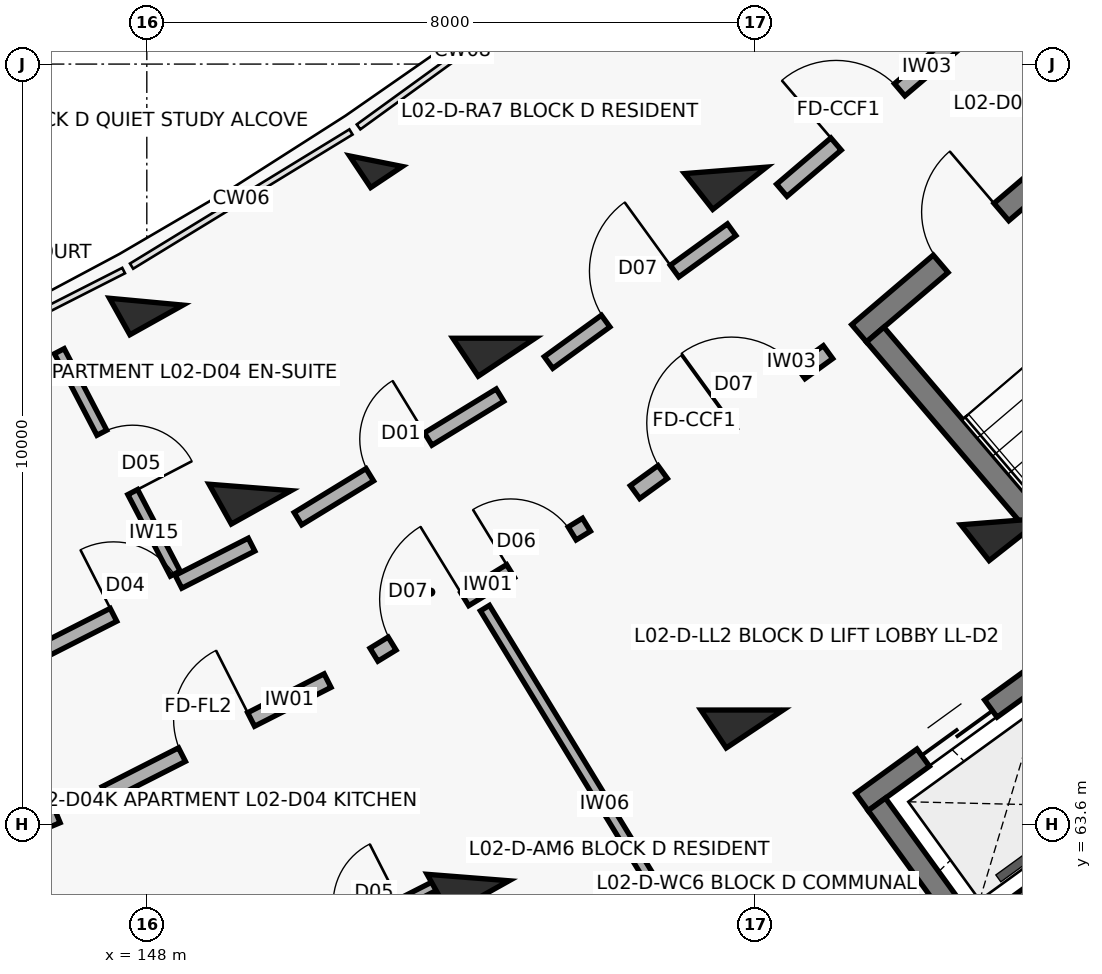
"""IFC4 building model, lengths in metres.
Left out: names, types, materials, properties, quantities, classifications, styles, units other than length and angle.
Written with IfcOpenShell. Run it as: python <this file> out.ifc"""

import sys

from ifc_helpers import new_model, si_unit, direction, frame, frame_2d, origin, origin_2d, place, context, subcontext, project, spatial, rectangle, extrude, element, fill, save


model = new_model("IFC4")
c1 = context("Model", 3, precision=1e-05, world=origin(), true_north=direction((0.0, 1.0)))
c2 = subcontext(c1, "Body", "Model", "MODEL_VIEW")
j1 = project(units=[si_unit("LENGTHUNIT", "METRE"), si_unit("PLANEANGLEUNIT", "RADIAN")], contexts=[c1])
p1 = place(None, origin())
s1 = spatial("IfcSite", under=j1, at=p1, CompositionType="ELEMENT")
p2 = place(p1, origin())
s2 = spatial("IfcBuilding", under=s1, at=p2, CompositionType="ELEMENT")
p3 = place(p2, frame((0.0, 0.0, 8.1)))
s3 = spatial("IfcBuildingStorey", under=s2, at=p3, CompositionType="ELEMENT", Elevation=8.1)
p4 = place(p3, frame((147.992, 70.474, 0.0), z_axis=(0.0, 0.0, 1.0), x_axis=(0.487859659139, -0.87292207727, 0.0)))
e1 = element("IfcColumn", 1, at=p4, inside=s3, PredefinedType="COLUMN", context=c2, shape_type="SweptSolid", body=[
    extrude(rectangle(XDim=0.55, YDim=0.8, at=origin_2d()), origin(), (0.0, 0.0, 1.0), 3.1),
])
for number, where, z_axis, x_axis in (
    (2, (149.358, 68.03, 0.0), (0.0, 0.0, 1.0), (0.488, -0.873, 0.0)),
    (3, (152.227, 62.897, 0.0), (0.0, 0.0, 1.0), (0.488, -0.873, 0.0)),
):
    element("IfcColumn", number, at=place(p3, frame(where, z_axis=z_axis, x_axis=x_axis)), inside=s3, PredefinedType="COLUMN", context=c2, shape_type="SweptSolid", body=[
        extrude(rectangle(XDim=0.6, YDim=0.9, at=origin_2d()), origin(), (0.0, 0.0, 1.0), 3.1),
    ])
p5 = place(p3, frame((151.015, 72.322, 0.0), z_axis=(0.0, 0.0, 1.0), x_axis=(0.554844427448, -0.83195412213, 0.0)))
e4 = element("IfcColumn", 4, at=p5, inside=s3, PredefinedType="COLUMN", context=c2, shape_type="SweptSolid", body=[
    extrude(rectangle(XDim=0.5, YDim=0.5, at=origin_2d()), origin(), (0.0, 0.0, 1.0), 3.1),
])
for number, where, z_axis, x_axis in (
    (5, (152.568, 69.993, 0.0), (0.0, 0.0, 1.0), (0.555, -0.832, 0.0)),
    (6, (155.831, 65.101, 0.0), (0.0, 0.0, 1.0), (0.555, -0.832, 0.0)),
    (7, (155.614, 72.202, 0.0), (0.0, 0.0, 1.0), (0.618, -0.786, 0.0)),
    (8, (159.25, 67.581, 0.0), (0.0, 0.0, 1.0), (0.618, -0.786, 0.0)),
):
    element("IfcColumn", number, at=place(p3, frame(where, z_axis=z_axis, x_axis=x_axis)), inside=s3, PredefinedType="COLUMN", context=c2, shape_type="SweptSolid", body=[
        extrude(rectangle(XDim=0.6, YDim=0.9, at=origin_2d()), origin(), (0.0, 0.0, 1.0), 3.1),
    ])
p6 = place(p3, frame((159.262, 79.041, 0.0), z_axis=(0.0, 0.0, 1.0), x_axis=(0.733738684326, -0.679431779595, 0.0)))
e9 = element("IfcWall", 9, at=p6, inside=s3, PredefinedType="SOLIDWALL", context=c2, shape_type="SweptSolid", body=[
    extrude(rectangle(XDim=8.2, YDim=0.265, at=frame_2d((4.1, 0.0))), origin(), (0.0, 0.0, 1.0), 2.08),
])
p7 = place(p6, frame((3.59, 0.0, 0.75)))
e10 = element("IfcOpeningElement", 10, at=p7, cuts=e9, PredefinedType="OPENING", context=c2, shape_type="SweptSolid", body=[
    extrude(rectangle(XDim=1.35, YDim=1.35, at=frame_2d((0.675, 0.675))), frame((0.0, 0.142, 0.0), z_axis=(0.0, -1.0, 0.0), x_axis=(1.0, 0.0, 0.0)), (0.0, 0.0, 1.0), 0.285),
])
p8 = place(p3, frame((157.372, 70.058, 0.0), z_axis=(0.0, 0.0, 1.0), x_axis=(0.760990583254, 0.648762924495, 0.0)))
e11 = element("IfcWall", 11, at=p8, inside=s3, PredefinedType="SHEAR", context=c2, shape_type="SweptSolid", body=[
    extrude(rectangle(XDim=3.87, YDim=0.3, at=frame_2d((1.935, 0.0))), origin(), (0.0, 0.0, 1.0), 3.1),
])
p9 = place(p8, frame((1.41, 0.0, 0.0)))
e12 = element("IfcOpeningElement", 12, at=p9, cuts=e11, PredefinedType="OPENING", context=c2, shape_type="SweptSolid", body=[
    extrude(rectangle(XDim=1.05, YDim=2.15, at=frame_2d((0.525, 1.075))), frame((0.0, 0.16, 0.0), z_axis=(0.0, -1.0, 0.0), x_axis=(1.0, 0.0, 0.0)), (0.0, 0.0, 1.0), 0.32),
])
p10 = place(p3, frame((157.583, 70.041, 0.0), z_axis=(0.0, 0.0, 1.0), x_axis=(0.648762810187, -0.760990680704, 0.0)))
e13 = element("IfcWall", 13, at=p10, inside=s3, PredefinedType="SHEAR", context=c2, shape_type="SweptSolid", body=[
    extrude(rectangle(XDim=7.69, YDim=0.3, at=frame_2d((3.845, 0.0))), origin(), (0.0, 0.0, 1.0), 3.1),
])
p11 = place(p3, frame((157.409, 63.89, 0.0), z_axis=(0.0, 0.0, 1.0), x_axis=(0.809510936031, 0.587104798521, 0.0)))
e14 = element("IfcWall", 14, at=p11, inside=s3, PredefinedType="SHEAR", context=c2, shape_type="SweptSolid", body=[
    extrude(rectangle(XDim=3.09, YDim=0.28, at=frame_2d((1.545, 0.0))), origin(), (0.0, 0.0, 1.0), 3.1),
])
p12 = place(p11, frame((0.995, 0.0, 0.0)))
e15 = element("IfcOpeningElement", 15, at=p12, cuts=e14, PredefinedType="OPENING", context=c2, shape_type="SweptSolid", body=[
    extrude(rectangle(XDim=1.1, YDim=2.15, at=frame_2d((0.55, 1.075))), frame((0.0, 0.15, 0.0), z_axis=(0.0, -1.0, 0.0), x_axis=(1.0, 0.0, 0.0)), (0.0, 0.0, 1.0), 0.3),
])
p13 = place(p3, frame((158.765, 62.021, 0.0), z_axis=(0.0, 0.0, 1.0), x_axis=(0.809548485838, 0.587053020669, 0.0)))
e16 = element("IfcWall", 16, at=p13, inside=s3, PredefinedType="SHEAR", context=c2, shape_type="SweptSolid", body=[
    extrude(rectangle(XDim=3.09, YDim=0.28, at=frame_2d((1.545, 0.0))), origin(), (0.0, 0.0, 1.0), 3.1),
])
p14 = place(p3, frame((157.604, 63.859, 0.0), z_axis=(0.0, 0.0, 1.0), x_axis=(0.587127188998, -0.809494696671, 0.0)))
e17 = element("IfcWall", 17, at=p14, inside=s3, PredefinedType="SHEAR", context=c2, shape_type="SweptSolid", body=[
    extrude(rectangle(XDim=2.03, YDim=0.28, at=frame_2d((1.015, 0.0))), origin(), (0.0, 0.0, 1.0), 3.1),
])
p15 = place(p3, frame((143.793, 62.459, 0.0), z_axis=(0.0, 0.0, 1.0), x_axis=(0.924214561665, 0.381873596896, 0.0)))
e18 = element("IfcWall", 18, at=p15, inside=s3, PredefinedType="SOLIDWALL", context=c2, shape_type="SweptSolid", body=[
    extrude(rectangle(XDim=3.277, YDim=0.2, at=frame_2d((1.639, 0.0))), origin(), (0.0, 0.0, 1.0), 2.08),
])
p16 = place(p15, frame((1.148, 0.0, 0.0)))
e19 = element("IfcOpeningElement", 19, at=p16, cuts=e18, PredefinedType="OPENING", context=c2, shape_type="SweptSolid", body=[
    extrude(rectangle(XDim=0.98, YDim=2.15, at=frame_2d((0.49, 1.075))), frame((0.0, 0.11, 0.0), z_axis=(0.0, -1.0, 0.0), x_axis=(1.0, 0.0, 0.0)), (0.0, 0.0, 1.0), 0.22),
])
p17 = place(p3, frame((147.457, 64.003, 0.0), z_axis=(0.0, 0.0, 1.0), x_axis=(0.891412167565, 0.45319349898, 0.0)))
e20 = element("IfcWall", 20, at=p17, inside=s3, PredefinedType="SOLIDWALL", context=c2, shape_type="SweptSolid", body=[
    extrude(rectangle(XDim=3.277, YDim=0.2, at=frame_2d((1.639, 0.0))), origin(), (0.0, 0.0, 1.0), 2.08),
])
p18 = place(p17, frame((1.128, 0.0, 0.0)))
e21 = element("IfcOpeningElement", 21, at=p18, cuts=e20, PredefinedType="OPENING", context=c2, shape_type="SweptSolid", body=[
    extrude(rectangle(XDim=1.02, YDim=2.15, at=frame_2d((0.51, 1.075))), frame((0.0, 0.11, 0.0), z_axis=(0.0, -1.0, 0.0), x_axis=(1.0, 0.0, 0.0)), (0.0, 0.0, 1.0), 0.22),
])
p19 = place(p3, frame((146.6, 65.865, 0.0), z_axis=(0.0, 0.0, 1.0), x_axis=(0.891414101388, 0.453189695212, 0.0)))
e22 = element("IfcWall", 22, at=p19, inside=s3, PredefinedType="SOLIDWALL", context=c2, shape_type="SweptSolid", body=[
    extrude(rectangle(XDim=3.116, YDim=0.19, at=frame_2d((1.558, 0.0))), origin(), (0.0, 0.0, 1.0), 2.08),
])
p20 = place(p19, frame((1.078, 0.0, 0.0)))
e23 = element("IfcOpeningElement", 23, at=p20, cuts=e22, PredefinedType="OPENING", context=c2, shape_type="SweptSolid", body=[
    extrude(rectangle(XDim=0.96, YDim=2.1, at=frame_2d((0.48, 1.05))), frame((0.0, 0.105, 0.0), z_axis=(0.0, -1.0, 0.0), x_axis=(1.0, 0.0, 0.0)), (0.0, 0.0, 1.0), 0.21),
])
p21 = place(p3, frame((146.849, 69.822, 0.0), z_axis=(0.0, 0.0, 1.0), x_axis=(0.462242343884, -0.886753638572, 0.0)))
e24 = element("IfcWall", 24, at=p21, inside=s3, PredefinedType="PARTITIONING", context=c2, shape_type="SweptSolid", body=[
    extrude(rectangle(XDim=3.3, YDim=0.145, at=frame_2d((1.65, 0.0))), origin(), (0.0, 0.0, 1.0), 2.08),
])
p22 = place(p21, frame((1.21, 0.0, 0.0)))
e25 = element("IfcOpeningElement", 25, at=p22, cuts=e24, PredefinedType="OPENING", context=c2, shape_type="SweptSolid", body=[
    extrude(rectangle(XDim=0.88, YDim=2.1, at=frame_2d((0.44, 1.05))), frame((0.0, 0.083, 0.0), z_axis=(0.0, -1.0, 0.0), x_axis=(1.0, 0.0, 0.0)), (0.0, 0.0, 1.0), 0.165),
])
p23 = place(p3, frame((148.687, 61.209, 0.0), z_axis=(0.0, 0.0, 1.0), x_axis=(0.891396224028, 0.453224857866, 0.0)))
e26 = element("IfcWall", 26, at=p23, inside=s3, PredefinedType="PARTITIONING", context=c2, shape_type="SweptSolid", body=[
    extrude(rectangle(XDim=3.617, YDim=0.125, at=frame_2d((1.808, 0.0))), origin(), (0.0, 0.0, 1.0), 2.08),
])
p24 = place(p23, frame((0.65, 0.0, 0.0)))
e27 = element("IfcOpeningElement", 27, at=p24, cuts=e26, PredefinedType="OPENING", context=c2, shape_type="SweptSolid", body=[
    extrude(rectangle(XDim=0.9, YDim=2.1, at=frame_2d((0.45, 1.05))), frame((0.0, 0.073, 0.0), z_axis=(0.0, -1.0, 0.0), x_axis=(1.0, 0.0, 0.0)), (0.0, 0.0, 1.0), 0.145),
])
p25 = place(p23, frame((2.086, 0.0, 0.0)))
e28 = element("IfcOpeningElement", 28, at=p25, cuts=e26, PredefinedType="OPENING", context=c2, shape_type="SweptSolid", body=[
    extrude(rectangle(XDim=0.88, YDim=2.1, at=frame_2d((0.44, 1.05))), frame((0.0, 0.073, 0.0), z_axis=(0.0, -1.0, 0.0), x_axis=(1.0, 0.0, 0.0)), (0.0, 0.0, 1.0), 0.145),
])
p26 = place(p3, frame((150.989, 65.829, 0.0), z_axis=(0.0, 0.0, 1.0), x_axis=(0.853090237845, 0.521763400492, 0.0)))
e29 = element("IfcWall", 29, at=p26, inside=s3, PredefinedType="SOLIDWALL", context=c2, shape_type="SweptSolid", body=[
    extrude(rectangle(XDim=3.277, YDim=0.2, at=frame_2d((1.638, 0.0))), origin(), (0.0, 0.0, 1.0), 2.08),
])
p27 = place(p26, frame((0.28, 0.0, 0.0)))
e30 = element("IfcOpeningElement", 30, at=p27, cuts=e29, PredefinedType="OPENING", context=c2, shape_type="SweptSolid", body=[
    extrude(rectangle(XDim=1.12, YDim=2.15, at=frame_2d((0.56, 1.075))), frame((0.0, 0.11, 0.0), z_axis=(0.0, -1.0, 0.0), x_axis=(1.0, 0.0, 0.0)), (0.0, 0.0, 1.0), 0.22),
])
p28 = place(p26, frame((2.107, 0.0, 0.0)))
e31 = element("IfcOpeningElement", 31, at=p28, cuts=e29, PredefinedType="OPENING", context=c2, shape_type="SweptSolid", body=[
    extrude(rectangle(XDim=0.95, YDim=2.1, at=frame_2d((0.475, 1.05))), frame((0.0, 0.11, 0.0), z_axis=(0.0, -1.0, 0.0), x_axis=(1.0, 0.0, 0.0)), (0.0, 0.0, 1.0), 0.22),
])
p29 = place(p3, frame((149.989, 67.619, 0.0), z_axis=(0.0, 0.0, 1.0), x_axis=(0.853121049608, 0.5217130195, 0.0)))
e32 = element("IfcWall", 32, at=p29, inside=s3, PredefinedType="SOLIDWALL", context=c2, shape_type="SweptSolid", body=[
    extrude(rectangle(XDim=3.116, YDim=0.19, at=frame_2d((1.558, 0.0))), origin(), (0.0, 0.0, 1.0), 2.08),
])
p30 = place(p29, frame((1.108, 0.0, 0.0)))
e33 = element("IfcOpeningElement", 33, at=p30, cuts=e32, PredefinedType="OPENING", context=c2, shape_type="SweptSolid", body=[
    extrude(rectangle(XDim=0.9, YDim=2.1, at=frame_2d((0.45, 1.05))), frame((0.0, 0.105, 0.0), z_axis=(0.0, -1.0, 0.0), x_axis=(1.0, 0.0, 0.0)), (0.0, 0.0, 1.0), 0.21),
])
p31 = place(p3, frame((152.448, 66.442, 0.0), z_axis=(0.0, 0.0, 1.0), x_axis=(0.520511872578, -0.853854431683, 0.0)))
e34 = element("IfcWall", 34, at=p31, inside=s3, PredefinedType="PARTITIONING", context=c2, shape_type="SweptSolid", body=[
    extrude(rectangle(XDim=7.95, YDim=0.14, at=frame_2d((3.975, 0.0))), origin(), (0.0, 0.0, 1.0), 2.08),
])
p32 = place(p31, frame((6.05, 0.0, 0.0)))
e35 = element("IfcOpeningElement", 35, at=p32, cuts=e34, PredefinedType="OPENING", context=c2, shape_type="SweptSolid", body=[
    extrude(rectangle(XDim=0.92, YDim=2.1, at=frame_2d((0.46, 1.05))), frame((0.0, 0.08, 0.0), z_axis=(0.0, -1.0, 0.0), x_axis=(1.0, 0.0, 0.0)), (0.0, 0.0, 1.0), 0.16),
])
p33 = place(p3, frame((154.423, 67.968, 0.0), z_axis=(0.0, 0.0, 1.0), x_axis=(0.809516127005, 0.587097641043, 0.0)))
e36 = element("IfcWall", 36, at=p33, inside=s3, PredefinedType="SOLIDWALL", context=c2, shape_type="SweptSolid", body=[
    extrude(rectangle(XDim=3.137, YDim=0.21, at=frame_2d((1.569, 0.0))), origin(), (0.0, 0.0, 1.0), 2.08),
])
p34 = place(p33, frame((0.45, 0.0, 0.0)))
e37 = element("IfcOpeningElement", 37, at=p34, cuts=e36, PredefinedType="OPENING", context=c2, shape_type="SweptSolid", body=[
    extrude(rectangle(XDim=1.1, YDim=2.15, at=frame_2d((0.55, 1.075))), frame((0.0, 0.115, 0.0), z_axis=(0.0, -1.0, 0.0), x_axis=(1.0, 0.0, 0.0)), (0.0, 0.0, 1.0), 0.23),
])
p35 = place(p33, frame((1.567, 0.0, 0.0)))
e38 = element("IfcOpeningElement", 38, at=p35, cuts=e36, PredefinedType="OPENING", context=c2, shape_type="SweptSolid", body=[
    extrude(rectangle(XDim=1.12, YDim=2.15, at=frame_2d((0.56, 1.075))), frame((0.0, 0.115, 0.0), z_axis=(0.0, -1.0, 0.0), x_axis=(1.0, 0.0, 0.0)), (0.0, 0.0, 1.0), 0.23),
])
p36 = place(p3, frame((153.285, 69.674, 0.0), z_axis=(0.0, 0.0, 1.0), x_axis=(0.809505174959, 0.587112741911, 0.0)))
e39 = element("IfcWall", 39, at=p36, inside=s3, PredefinedType="SOLIDWALL", context=c2, shape_type="SweptSolid", body=[
    extrude(rectangle(XDim=2.976, YDim=0.19, at=frame_2d((1.488, 0.0))), origin(), (0.0, 0.0, 1.0), 2.08),
])
p37 = place(p36, frame((0.928, 0.0, 0.0)))
e40 = element("IfcOpeningElement", 40, at=p37, cuts=e39, PredefinedType="OPENING", context=c2, shape_type="SweptSolid", body=[
    extrude(rectangle(XDim=1.12, YDim=2.15, at=frame_2d((0.56, 1.075))), frame((0.0, 0.105, 0.0), z_axis=(0.0, -1.0, 0.0), x_axis=(1.0, 0.0, 0.0)), (0.0, 0.0, 1.0), 0.21),
])
p38 = place(p3, frame((156.354, 71.94, 0.0), z_axis=(0.0, 0.0, 1.0), x_axis=(0.760991187621, 0.648762215579, 0.0)))
e41 = element("IfcWall", 41, at=p38, inside=s3, PredefinedType="SOLIDWALL", context=c2, shape_type="SweptSolid", body=[
    extrude(rectangle(XDim=2.976, YDim=0.21, at=frame_2d((1.488, 0.0))), origin(), (0.0, 0.0, 1.0), 2.08),
])
p39 = place(p38, frame((0.938, 0.0, 0.0)))
e42 = element("IfcOpeningElement", 42, at=p39, cuts=e41, PredefinedType="OPENING", context=c2, shape_type="SweptSolid", body=[
    extrude(rectangle(XDim=1.1, YDim=2.15, at=frame_2d((0.55, 1.075))), frame((0.0, 0.115, 0.0), z_axis=(0.0, -1.0, 0.0), x_axis=(1.0, 0.0, 0.0)), (0.0, 0.0, 1.0), 0.23),
])
p40 = place(p9, origin())
e43 = element("IfcDoor", 43, at=p40, inside=s3, OperationType="SINGLE_SWING_RIGHT", PredefinedType="DOOR", context=c2, shape_type="SweptSolid", body=[
    extrude(rectangle(XDim=1.05, YDim=2.15, at=frame_2d((0.525, 1.075))), frame((0.0, 0.025, 0.0), z_axis=(0.0, -1.0, 0.0), x_axis=(1.0, 0.0, 0.0)), (0.0, 0.0, 1.0), 0.05),
])
fill(e12, e43)
p41 = place(p12, origin())
e44 = element("IfcDoor", 44, at=p41, inside=s3, OperationType="DOUBLE_DOOR_SLIDING", PredefinedType="DOOR", context=c2, shape_type="SweptSolid", body=[
    extrude(rectangle(XDim=1.1, YDim=2.15, at=frame_2d((0.55, 1.075))), frame((0.0, 0.025, 0.0), z_axis=(0.0, -1.0, 0.0), x_axis=(1.0, 0.0, 0.0)), (0.0, 0.0, 1.0), 0.05),
])
fill(e15, e44)
p42 = place(p18, origin())
e45 = element("IfcDoor", 45, at=p42, inside=s3, OperationType="SINGLE_SWING_RIGHT", PredefinedType="DOOR", context=c2, shape_type="SweptSolid", body=[
    extrude(rectangle(XDim=1.02, YDim=2.15, at=frame_2d((0.51, 1.075))), frame((0.0, 0.025, 0.0), z_axis=(0.0, -1.0, 0.0), x_axis=(1.0, 0.0, 0.0)), (0.0, 0.0, 1.0), 0.05),
])
fill(e21, e45)
p43 = place(p20, origin())
e46 = element("IfcDoor", 46, at=p43, inside=s3, OperationType="SINGLE_SWING_LEFT", PredefinedType="DOOR", context=c2, shape_type="SweptSolid", body=[
    extrude(rectangle(XDim=0.96, YDim=2.1, at=frame_2d((0.48, 1.05))), frame((0.0, 0.025, 0.0), z_axis=(0.0, -1.0, 0.0), x_axis=(1.0, 0.0, 0.0)), (0.0, 0.0, 1.0), 0.05),
])
fill(e23, e46)
p44 = place(p22, origin())
e47 = element("IfcDoor", 47, at=p44, inside=s3, OperationType="SINGLE_SWING_RIGHT", PredefinedType="DOOR", context=c2, shape_type="SweptSolid", body=[
    extrude(rectangle(XDim=0.88, YDim=2.1, at=frame_2d((0.44, 1.05))), frame((0.0, 0.025, 0.0), z_axis=(0.0, -1.0, 0.0), x_axis=(1.0, 0.0, 0.0)), (0.0, 0.0, 1.0), 0.05),
])
fill(e25, e47)
p45 = place(p27, origin())
e48 = element("IfcDoor", 48, at=p45, inside=s3, OperationType="SINGLE_SWING_RIGHT", PredefinedType="DOOR", context=c2, shape_type="SweptSolid", body=[
    extrude(rectangle(XDim=1.12, YDim=2.15, at=frame_2d((0.56, 1.075))), frame((0.0, 0.025, 0.0), z_axis=(0.0, -1.0, 0.0), x_axis=(1.0, 0.0, 0.0)), (0.0, 0.0, 1.0), 0.05),
])
fill(e30, e48)
p46 = place(p28, origin())
e49 = element("IfcDoor", 49, at=p46, inside=s3, OperationType="SINGLE_SWING_LEFT", PredefinedType="DOOR", context=c2, shape_type="SweptSolid", body=[
    extrude(rectangle(XDim=0.95, YDim=2.1, at=frame_2d((0.475, 1.05))), frame((0.0, 0.025, 0.0), z_axis=(0.0, -1.0, 0.0), x_axis=(1.0, 0.0, 0.0)), (0.0, 0.0, 1.0), 0.05),
])
fill(e31, e49)
p47 = place(p30, origin())
e50 = element("IfcDoor", 50, at=p47, inside=s3, OperationType="SINGLE_SWING_RIGHT", PredefinedType="DOOR", context=c2, shape_type="SweptSolid", body=[
    extrude(rectangle(XDim=0.9, YDim=2.1, at=frame_2d((0.45, 1.05))), frame((0.0, 0.025, 0.0), z_axis=(0.0, -1.0, 0.0), x_axis=(1.0, 0.0, 0.0)), (0.0, 0.0, 1.0), 0.05),
])
fill(e33, e50)
p48 = place(p34, origin())
e51 = element("IfcDoor", 51, at=p48, inside=s3, OperationType="SINGLE_SWING_RIGHT", PredefinedType="DOOR", context=c2, shape_type="SweptSolid", body=[
    extrude(rectangle(XDim=1.1, YDim=2.15, at=frame_2d((0.55, 1.075))), frame((0.0, 0.025, 0.0), z_axis=(0.0, -1.0, 0.0), x_axis=(1.0, 0.0, 0.0)), (0.0, 0.0, 1.0), 0.05),
])
fill(e37, e51)
p49 = place(p35, origin())
e52 = element("IfcDoor", 52, at=p49, inside=s3, OperationType="SINGLE_SWING_LEFT", PredefinedType="DOOR", context=c2, shape_type="SweptSolid", body=[
    extrude(rectangle(XDim=1.12, YDim=2.15, at=frame_2d((0.56, 1.075))), frame((0.0, 0.025, 0.0), z_axis=(0.0, -1.0, 0.0), x_axis=(1.0, 0.0, 0.0)), (0.0, 0.0, 1.0), 0.05),
])
fill(e38, e52)
p50 = place(p37, origin())
e53 = element("IfcDoor", 53, at=p50, inside=s3, OperationType="SINGLE_SWING_RIGHT", PredefinedType="DOOR", context=c2, shape_type="SweptSolid", body=[
    extrude(rectangle(XDim=1.12, YDim=2.15, at=frame_2d((0.56, 1.075))), frame((0.0, 0.025, 0.0), z_axis=(0.0, -1.0, 0.0), x_axis=(1.0, 0.0, 0.0)), (0.0, 0.0, 1.0), 0.05),
])
fill(e40, e53)
p51 = place(p39, origin())
e54 = element("IfcDoor", 54, at=p51, inside=s3, OperationType="SINGLE_SWING_LEFT", PredefinedType="DOOR", context=c2, shape_type="SweptSolid", body=[
    extrude(rectangle(XDim=1.1, YDim=2.15, at=frame_2d((0.55, 1.075))), frame((0.0, 0.025, 0.0), z_axis=(0.0, -1.0, 0.0), x_axis=(1.0, 0.0, 0.0)), (0.0, 0.0, 1.0), 0.05),
])
fill(e42, e54)
save(model, sys.argv[1])
